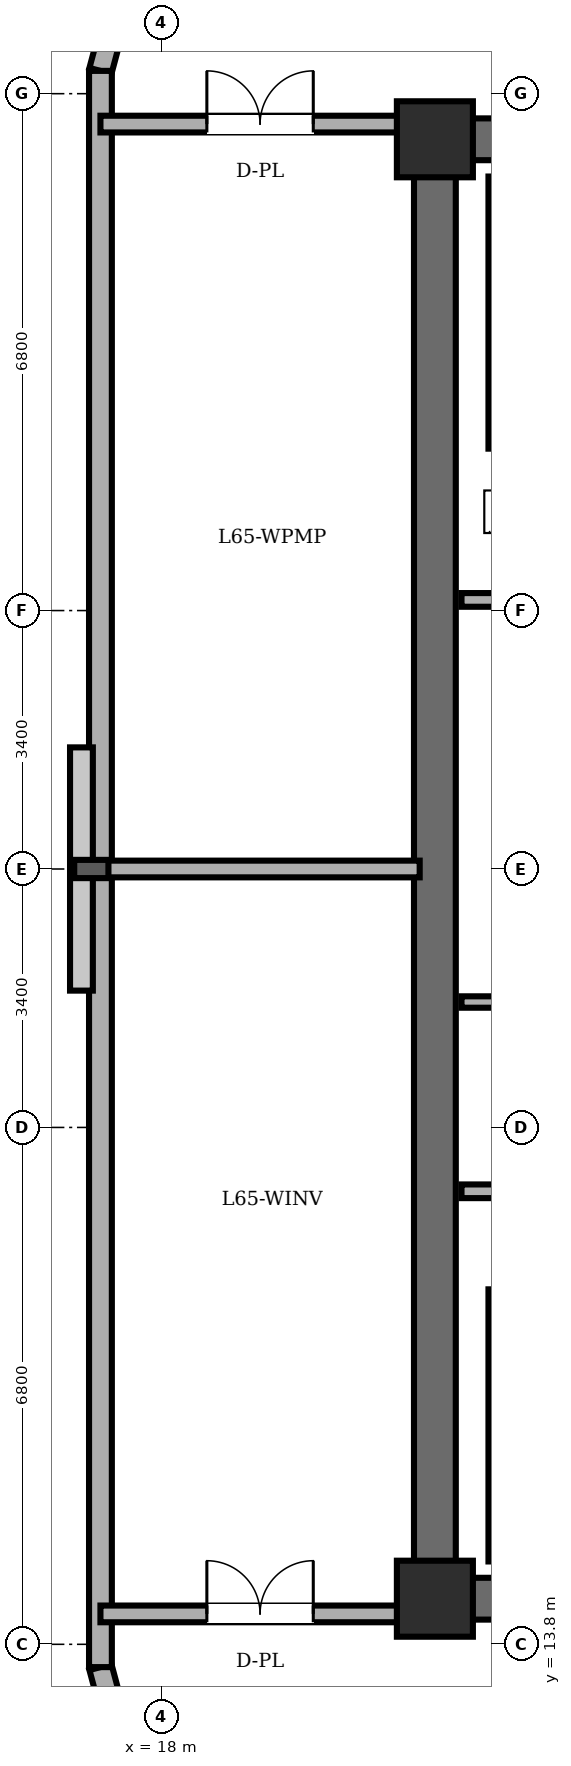
"""IFC4 building model, lengths in metres.
Left out: names, types, materials, properties, quantities, classifications, styles, units other than length and angle.
Written with IfcOpenShell. Run it as: python <this file> out.ifc"""

import sys

from ifc_helpers import new_model, si_unit, direction, frame, frame_2d, origin, origin_2d, place, context, subcontext, project, spatial, rectangle, extrude, element, fill, save


model = new_model("IFC4")
c1 = context("Model", 3, precision=1e-05, world=origin(), true_north=direction((0.0, 1.0)))
c2 = subcontext(c1, "Body", "Model", "MODEL_VIEW")
j1 = project(units=[si_unit("LENGTHUNIT", "METRE"), si_unit("PLANEANGLEUNIT", "RADIAN")], contexts=[c1])
p1 = place(None, origin())
s1 = spatial("IfcSite", under=j1, at=p1, CompositionType="ELEMENT")
p2 = place(p1, origin())
s2 = spatial("IfcBuilding", under=s1, at=p2, CompositionType="ELEMENT")
p3 = place(p2, frame((0.0, 0.0, 248.1)))
s3 = spatial("IfcBuildingStorey", under=s2, at=p3, CompositionType="ELEMENT", Elevation=248.1)
for number, where, z_axis, x_axis in (
    (1, (21.6, 14.4, 0.0), (0.0, 0.0, 1.0), (1.0, 0.0, 0.0)),
    (2, (21.6, 33.6, 0.0), (0.0, 0.0, 1.0), (1.0, 0.0, 0.0)),
):
    element("IfcColumn", number, at=place(p3, frame(where, z_axis=z_axis, x_axis=x_axis)), inside=s3, PredefinedType="COLUMN", context=c2, shape_type="SweptSolid", body=[
        extrude(rectangle(XDim=1.0, YDim=1.0, at=origin_2d()), origin(), (0.0, 0.0, 1.0), 5.6),
    ])
for number, where, z_axis, x_axis in (
    (3, (17.2, 13.5, 0.0), (0.0, 0.0, 1.0), (0.259, -0.966, 0.0)),
    (4, (17.897, 37.1, 0.0), (0.0, 0.0, 1.0), (-0.259, -0.966, 0.0)),
):
    element("IfcWall", number, at=place(p3, frame(where, z_axis=z_axis, x_axis=x_axis)), inside=s3, PredefinedType="SOLIDWALL", context=c2, shape_type="SweptSolid", body=[
        extrude(rectangle(XDim=2.692, YDim=0.3, at=frame_2d((1.346, 0.0))), origin(), (0.0, 0.0, 1.0), 5.36),
    ])
p4 = place(p3, frame((17.2, 34.5, 0.0), z_axis=(0.0, 0.0, 1.0), x_axis=(0.0, -1.0, 0.0)))
e5 = element("IfcWall", 5, at=p4, inside=s3, PredefinedType="SOLIDWALL", context=c2, shape_type="SweptSolid", body=[
    extrude(rectangle(XDim=21.0, YDim=0.3, at=frame_2d((10.5, 0.0))), origin(), (0.0, 0.0, 1.0), 5.36),
])
p5 = place(p3, frame((21.6, 14.4, 0.0), z_axis=(0.0, 0.0, 1.0), x_axis=(0.0, 1.0, 0.0)))
e6 = element("IfcWall", 6, at=p5, inside=s3, PredefinedType="SHEAR", context=c2, shape_type="SweptSolid", body=[
    extrude(rectangle(XDim=19.2, YDim=0.55, at=frame_2d((9.6, 0.0))), origin(), (0.0, 0.0, 1.0), 5.36),
])
for number, where, z_axis, x_axis in (
    (7, (21.6, 33.6, 0.0), (0.0, 0.0, 1.0), (1.0, 0.0, 0.0)),
    (8, (37.2, 14.4, 0.0), (0.0, 0.0, 1.0), (-1.0, 0.0, 0.0)),
):
    element("IfcWall", number, at=place(p3, frame(where, z_axis=z_axis, x_axis=x_axis)), inside=s3, PredefinedType="SHEAR", context=c2, shape_type="SweptSolid", body=[
        extrude(rectangle(XDim=15.6, YDim=0.55, at=frame_2d((7.8, 0.0))), origin(), (0.0, 0.0, 1.0), 5.36),
    ])
for number, where, z_axis, x_axis in (
    (9, (22.48, 29.53, 0.0), (0.0, 0.0, 1.0), (0.0, 1.0, 0.0)),
    (10, (22.48, 14.89, 0.0), (0.0, 0.0, 1.0), (0.0, 1.0, 0.0)),
):
    element("IfcWall", number, at=place(p3, frame(where, z_axis=z_axis, x_axis=x_axis)), inside=s3, PredefinedType="SOLIDWALL", context=c2, shape_type="SweptSolid", body=[
        extrude(rectangle(XDim=3.58, YDim=0.35, at=frame_2d((1.79, 0.0))), origin(), (0.0, 0.0, 1.0), 5.36),
    ])
p6 = place(p3, frame((21.95, 27.54, 0.0), z_axis=(0.0, 0.0, 1.0), x_axis=(1.0, 0.0, 0.0)))
e11 = element("IfcWall", 11, at=p6, inside=s3, PredefinedType="PARTITIONING", context=c2, shape_type="SweptSolid", body=[
    extrude(rectangle(XDim=10.56, YDim=0.18, at=frame_2d((5.28, 0.0))), origin(), (0.0, 0.0, 1.0), 5.36),
])
p7 = place(p3, frame((21.95, 19.76, 0.0), z_axis=(0.0, 0.0, 1.0), x_axis=(1.0, 0.0, 0.0)))
e12 = element("IfcWall", 12, at=p7, inside=s3, PredefinedType="PARTITIONING", context=c2, shape_type="SweptSolid", body=[
    extrude(rectangle(XDim=14.87, YDim=0.18, at=frame_2d((7.435, 0.0))), origin(), (0.0, 0.0, 1.0), 5.36),
])
p8 = place(p3, frame((21.95, 22.25, 0.0), z_axis=(0.0, 0.0, 1.0), x_axis=(1.0, 0.0, 0.0)))
e13 = element("IfcWall", 13, at=p8, inside=s3, PredefinedType="PARTITIONING", context=c2, shape_type="SweptSolid", body=[
    extrude(rectangle(XDim=6.63, YDim=0.15, at=frame_2d((3.315, 0.0))), origin(), (0.0, 0.0, 1.0), 5.36),
])
p9 = place(p3, frame((17.2, 14.2, 0.0), z_axis=(0.0, 0.0, 1.0), x_axis=(1.0, 0.0, 0.0)))
e14 = element("IfcWall", 14, at=p9, inside=s3, PredefinedType="PARTITIONING", context=c2, shape_type="SweptSolid", body=[
    extrude(rectangle(XDim=4.2, YDim=0.22, at=frame_2d((2.1, 0.0))), origin(), (0.0, 0.0, 1.0), 5.36),
])
p10 = place(p9, frame((1.4, 0.0, 0.0)))
e15 = element("IfcOpeningElement", 15, at=p10, cuts=e14, PredefinedType="OPENING", context=c2, shape_type="SweptSolid", body=[
    extrude(rectangle(XDim=1.4, YDim=2.25, at=frame_2d((0.7, 1.125))), frame((0.0, 0.12, 0.0), z_axis=(0.0, -1.0, 0.0), x_axis=(1.0, 0.0, 0.0)), (0.0, 0.0, 1.0), 0.24),
])
p11 = place(p3, frame((17.2, 24.0, 0.0), z_axis=(0.0, 0.0, 1.0), x_axis=(1.0, 0.0, 0.0)))
e16 = element("IfcWall", 16, at=p11, inside=s3, PredefinedType="PARTITIONING", context=c2, shape_type="SweptSolid", body=[
    extrude(rectangle(XDim=4.2, YDim=0.22, at=frame_2d((2.1, 0.0))), origin(), (0.0, 0.0, 1.0), 5.36),
])
p12 = place(p3, frame((17.2, 33.8, 0.0), z_axis=(0.0, 0.0, 1.0), x_axis=(1.0, 0.0, 0.0)))
e17 = element("IfcWall", 17, at=p12, inside=s3, PredefinedType="PARTITIONING", context=c2, shape_type="SweptSolid", body=[
    extrude(rectangle(XDim=4.2, YDim=0.22, at=frame_2d((2.1, 0.0))), origin(), (0.0, 0.0, 1.0), 5.36),
])
p13 = place(p12, frame((1.4, 0.0, 0.0)))
e18 = element("IfcOpeningElement", 18, at=p13, cuts=e17, PredefinedType="OPENING", context=c2, shape_type="SweptSolid", body=[
    extrude(rectangle(XDim=1.4, YDim=2.25, at=frame_2d((0.7, 1.125))), frame((0.0, 0.12, 0.0), z_axis=(0.0, -1.0, 0.0), x_axis=(1.0, 0.0, 0.0)), (0.0, 0.0, 1.0), 0.24),
])
p14 = place(p10, origin())
e19 = element("IfcDoor", 19, at=p14, inside=s3, OperationType="DOUBLE_DOOR_SINGLE_SWING", PredefinedType="DOOR", context=c2, shape_type="SweptSolid", body=[
    extrude(rectangle(XDim=1.4, YDim=2.25, at=frame_2d((0.7, 1.125))), frame((0.0, 0.025, 0.0), z_axis=(0.0, -1.0, 0.0), x_axis=(1.0, 0.0, 0.0)), (0.0, 0.0, 1.0), 0.05),
])
fill(e15, e19)
p15 = place(p13, origin())
e20 = element("IfcDoor", 20, at=p15, inside=s3, OperationType="DOUBLE_DOOR_SINGLE_SWING", PredefinedType="DOOR", context=c2, shape_type="SweptSolid", body=[
    extrude(rectangle(XDim=1.4, YDim=2.25, at=frame_2d((0.7, 1.125))), frame((0.0, 0.025, 0.0), z_axis=(0.0, -1.0, 0.0), x_axis=(1.0, 0.0, 0.0)), (0.0, 0.0, 1.0), 0.05),
])
fill(e18, e20)
save(model, sys.argv[1])
